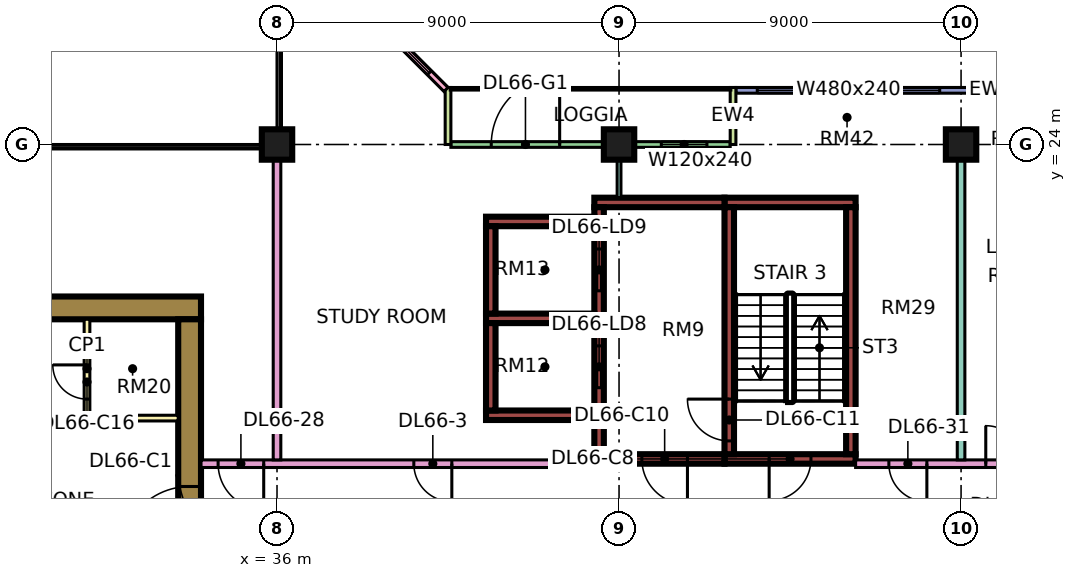
"""IFC4 building model, lengths in metres.
Left out: names, types, materials, properties, quantities, classifications, styles, units other than length and angle.
Written with IfcOpenShell. Run it as: python <this file> out.ifc"""

import sys

from ifc_helpers import new_model, si_unit, direction, frame, frame_2d, origin, origin_2d, place, context, subcontext, project, spatial, rectangle, extrude, element, fill, save


model = new_model("IFC4")
c1 = context("Model", 3, precision=1e-05, world=origin(), true_north=direction((0.0, 1.0)))
c2 = subcontext(c1, "Body", "Model", "MODEL_VIEW")
j1 = project(units=[si_unit("LENGTHUNIT", "METRE"), si_unit("PLANEANGLEUNIT", "RADIAN")], contexts=[c1])
p1 = place(None, origin())
s1 = spatial("IfcSite", under=j1, at=p1, CompositionType="ELEMENT")
p2 = place(p1, origin())
s2 = spatial("IfcBuilding", under=s1, at=p2, CompositionType="ELEMENT")
p3 = place(p2, frame((0.0, 0.0, 284.65)))
s3 = spatial("IfcBuildingStorey", under=s2, at=p3, CompositionType="ELEMENT", Elevation=284.65)
for number, where, z_axis, x_axis in (
    (1, (36.0, 24.0, 0.0), (0.0, 0.0, 1.0), (1.0, 0.0, 0.0)),
    (2, (45.0, 24.0, 0.0), (0.0, 0.0, 1.0), (1.0, 0.0, 0.0)),
    (3, (54.0, 24.0, 0.0), (0.0, 0.0, 1.0), (1.0, 0.0, 0.0)),
):
    element("IfcColumn", number, at=place(p3, frame(where, z_axis=z_axis, x_axis=x_axis)), inside=s3, PredefinedType="COLUMN", context=c2, shape_type="SweptSolid", body=[
        extrude(rectangle(XDim=0.8, YDim=0.8, at=origin_2d()), origin(), (0.0, 0.0, 1.0), 3.75),
    ])
p4 = place(p3, frame((9.0, 19.7, 0.0), z_axis=(0.0, 0.0, 1.0), x_axis=(1.0, 0.0, 0.0)))
e4 = element("IfcWall", 4, at=p4, inside=s3, PredefinedType="SHEAR", context=c2, shape_type="SweptSolid", body=[
    extrude(rectangle(XDim=25.0, YDim=0.6, at=frame_2d((12.5, 0.0))), origin(), (0.0, 0.0, 1.0), 3.75),
])
p5 = place(p4, frame((19.1, 0.0, 0.0)))
e5 = element("IfcOpeningElement", 5, at=p5, cuts=e4, PredefinedType="OPENING", context=c2, shape_type="SweptSolid", body=[
    extrude(rectangle(XDim=1.8, YDim=2.4, at=frame_2d((0.9, 1.2))), frame((0.0, 0.31, 0.0), z_axis=(0.0, -1.0, 0.0), x_axis=(1.0, 0.0, 0.0)), (0.0, 0.0, 1.0), 0.62),
])
p6 = place(p3, frame((33.7, 7.6, 0.0), z_axis=(0.0, 0.0, 1.0), x_axis=(0.0, 1.0, 0.0)))
e6 = element("IfcWall", 6, at=p6, inside=s3, PredefinedType="SHEAR", context=c2, shape_type="SweptSolid", body=[
    extrude(rectangle(XDim=11.8, YDim=0.6, at=frame_2d((5.9, 0.0))), origin(), (0.0, 0.0, 1.0), 3.75),
])
p7 = place(p6, frame((5.6, 0.0, 0.0)))
e7 = element("IfcOpeningElement", 7, at=p7, cuts=e6, PredefinedType="OPENING", context=c2, shape_type="SweptSolid", body=[
    extrude(rectangle(XDim=1.8, YDim=2.4, at=frame_2d((0.9, 1.2))), frame((0.0, 0.31, 0.0), z_axis=(0.0, -1.0, 0.0), x_axis=(1.0, 0.0, 0.0)), (0.0, 0.0, 1.0), 0.62),
])
p8 = place(p3, frame((47.775, 15.725, 0.0), z_axis=(0.0, 0.0, 1.0), x_axis=(1.0, 0.0, 0.0)))
e8 = element("IfcWall", 8, at=p8, inside=s3, PredefinedType="SHEAR", context=c2, shape_type="SweptSolid", body=[
    extrude(rectangle(XDim=3.45, YDim=0.25, at=frame_2d((1.725, 0.0))), origin(), (0.0, 0.0, 1.0), 3.75),
])
p9 = place(p8, frame((1.175, 0.0, 0.0)))
e9 = element("IfcOpeningElement", 9, at=p9, cuts=e8, PredefinedType="OPENING", context=c2, shape_type="SweptSolid", body=[
    extrude(rectangle(XDim=1.1, YDim=2.2, at=frame_2d((0.55, 1.1))), frame((0.0, 0.135, 0.0), z_axis=(0.0, -1.0, 0.0), x_axis=(1.0, 0.0, 0.0)), (0.0, 0.0, 1.0), 0.27),
])
p10 = place(p3, frame((47.775, 22.475, 0.0), z_axis=(0.0, 0.0, 1.0), x_axis=(1.0, 0.0, 0.0)))
e10 = element("IfcWall", 10, at=p10, inside=s3, PredefinedType="SHEAR", context=c2, shape_type="SweptSolid", body=[
    extrude(rectangle(XDim=3.45, YDim=0.25, at=frame_2d((1.725, 0.0))), origin(), (0.0, 0.0, 1.0), 3.75),
])
p11 = place(p3, frame((47.9, 15.85, 0.0), z_axis=(0.0, 0.0, 1.0), x_axis=(0.0, 1.0, 0.0)))
e11 = element("IfcWall", 11, at=p11, inside=s3, PredefinedType="SHEAR", context=c2, shape_type="SweptSolid", body=[
    extrude(rectangle(XDim=6.5, YDim=0.25, at=frame_2d((3.25, 0.0))), origin(), (0.0, 0.0, 1.0), 3.75),
])
p12 = place(p11, frame((0.35, 0.0, 0.0)))
e12 = element("IfcOpeningElement", 12, at=p12, cuts=e11, PredefinedType="OPENING", context=c2, shape_type="SweptSolid", body=[
    extrude(rectangle(XDim=1.1, YDim=2.2, at=frame_2d((0.55, 1.1))), frame((0.0, 0.135, 0.0), z_axis=(0.0, -1.0, 0.0), x_axis=(1.0, 0.0, 0.0)), (0.0, 0.0, 1.0), 0.27),
])
p13 = place(p3, frame((51.1, 15.85, 0.0), z_axis=(0.0, 0.0, 1.0), x_axis=(0.0, 1.0, 0.0)))
e13 = element("IfcWall", 13, at=p13, inside=s3, PredefinedType="SHEAR", context=c2, shape_type="SweptSolid", body=[
    extrude(rectangle(XDim=6.5, YDim=0.25, at=frame_2d((3.25, 0.0))), origin(), (0.0, 0.0, 1.0), 3.75),
])
p14 = place(p3, frame((44.35, 15.725, 0.0), z_axis=(0.0, 0.0, 1.0), x_axis=(1.0, 0.0, 0.0)))
e14 = element("IfcWall", 14, at=p14, inside=s3, PredefinedType="SHEAR", context=c2, shape_type="SweptSolid", body=[
    extrude(rectangle(XDim=3.425, YDim=0.25, at=frame_2d((1.712, 0.0))), origin(), (0.0, 0.0, 1.0), 3.75),
])
p15 = place(p14, frame((1.25, 0.0, 0.0)))
e15 = element("IfcOpeningElement", 15, at=p15, cuts=e14, PredefinedType="OPENING", context=c2, shape_type="SweptSolid", body=[
    extrude(rectangle(XDim=1.2, YDim=2.2, at=frame_2d((0.6, 1.1))), frame((0.0, 0.135, 0.0), z_axis=(0.0, -1.0, 0.0), x_axis=(1.0, 0.0, 0.0)), (0.0, 0.0, 1.0), 0.27),
])
p16 = place(p3, frame((44.35, 22.475, 0.0), z_axis=(0.0, 0.0, 1.0), x_axis=(1.0, 0.0, 0.0)))
e16 = element("IfcWall", 16, at=p16, inside=s3, PredefinedType="SHEAR", context=c2, shape_type="SweptSolid", body=[
    extrude(rectangle(XDim=3.425, YDim=0.25, at=frame_2d((1.712, 0.0))), origin(), (0.0, 0.0, 1.0), 3.75),
])
p17 = place(p3, frame((44.475, 15.85, 0.0), z_axis=(0.0, 0.0, 1.0), x_axis=(0.0, 1.0, 0.0)))
e17 = element("IfcWall", 17, at=p17, inside=s3, PredefinedType="SHEAR", context=c2, shape_type="SweptSolid", body=[
    extrude(rectangle(XDim=6.5, YDim=0.25, at=frame_2d((3.25, 0.0))), origin(), (0.0, 0.0, 1.0), 3.75),
])
p18 = place(p17, frame((1.75, 0.0, 0.0)))
e18 = element("IfcOpeningElement", 18, at=p18, cuts=e17, PredefinedType="OPENING", context=c2, shape_type="SweptSolid", body=[
    extrude(rectangle(XDim=1.1, YDim=2.2, at=frame_2d((0.55, 1.1))), frame((0.0, 0.135, 0.0), z_axis=(0.0, -1.0, 0.0), x_axis=(1.0, 0.0, 0.0)), (0.0, 0.0, 1.0), 0.27),
])
p19 = place(p17, frame((4.3, 0.0, 0.0)))
e19 = element("IfcOpeningElement", 19, at=p19, cuts=e17, PredefinedType="OPENING", context=c2, shape_type="SweptSolid", body=[
    extrude(rectangle(XDim=1.1, YDim=2.2, at=frame_2d((0.55, 1.1))), frame((0.0, 0.135, 0.0), z_axis=(0.0, -1.0, 0.0), x_axis=(1.0, 0.0, 0.0)), (0.0, 0.0, 1.0), 0.27),
])
for number, where, z_axis, x_axis in (
    (20, (41.5, 16.875, 0.0), (0.0, 0.0, 1.0), (1.0, 0.0, 0.0)),
    (21, (41.5, 19.425, 0.0), (0.0, 0.0, 1.0), (1.0, 0.0, 0.0)),
    (22, (41.5, 21.975, 0.0), (0.0, 0.0, 1.0), (1.0, 0.0, 0.0)),
):
    element("IfcWall", number, at=place(p3, frame(where, z_axis=z_axis, x_axis=x_axis)), inside=s3, PredefinedType="SHEAR", context=c2, shape_type="SweptSolid", body=[
        extrude(rectangle(XDim=2.85, YDim=0.25, at=frame_2d((1.425, 0.0))), origin(), (0.0, 0.0, 1.0), 3.75),
    ])
for number, where, z_axis, x_axis in (
    (23, (41.625, 17.0, 0.0), (0.0, 0.0, 1.0), (0.0, 1.0, 0.0)),
    (24, (41.625, 19.55, 0.0), (0.0, 0.0, 1.0), (0.0, 1.0, 0.0)),
):
    element("IfcWall", number, at=place(p3, frame(where, z_axis=z_axis, x_axis=x_axis)), inside=s3, PredefinedType="SHEAR", context=c2, shape_type="SweptSolid", body=[
        extrude(rectangle(XDim=2.3, YDim=0.25, at=frame_2d((1.15, 0.0))), origin(), (0.0, 0.0, 1.0), 3.75),
    ])
p20 = place(p3, frame((61.5, 25.425, 0.0), z_axis=(0.0, 0.0, 1.0), x_axis=(-1.0, 0.0, 0.0)))
e25 = element("IfcWall", 25, at=p20, inside=s3, PredefinedType="SOLIDWALL", context=c2, shape_type="SweptSolid", body=[
    extrude(rectangle(XDim=13.425, YDim=0.15, at=frame_2d((6.712, 0.0))), origin(), (0.0, 0.0, 1.0), 3.35),
])
p21 = place(p20, frame((0.3, 0.0, 0.45)))
e26 = element("IfcOpeningElement", 26, at=p21, cuts=e25, PredefinedType="OPENING", context=c2, shape_type="SweptSolid", body=[
    extrude(rectangle(XDim=0.9, YDim=2.4, at=frame_2d((0.45, 1.2))), frame((0.0, 0.085, 0.0), z_axis=(0.0, -1.0, 0.0), x_axis=(1.0, 0.0, 0.0)), (0.0, 0.0, 1.0), 0.17),
])
p22 = place(p20, frame((2.1, 0.0, 0.45)))
e27 = element("IfcOpeningElement", 27, at=p22, cuts=e25, PredefinedType="OPENING", context=c2, shape_type="SweptSolid", body=[
    extrude(rectangle(XDim=1.8, YDim=2.4, at=frame_2d((0.9, 1.2))), frame((0.0, 0.085, 0.0), z_axis=(0.0, -1.0, 0.0), x_axis=(1.0, 0.0, 0.0)), (0.0, 0.0, 1.0), 0.17),
])
p23 = place(p20, frame((5.1, 0.0, 0.45)))
e28 = element("IfcOpeningElement", 28, at=p23, cuts=e25, PredefinedType="OPENING", context=c2, shape_type="SweptSolid", body=[
    extrude(rectangle(XDim=1.8, YDim=2.4, at=frame_2d((0.9, 1.2))), frame((0.0, 0.085, 0.0), z_axis=(0.0, -1.0, 0.0), x_axis=(1.0, 0.0, 0.0)), (0.0, 0.0, 1.0), 0.17),
])
p24 = place(p20, frame((8.062, 0.0, 0.45)))
e29 = element("IfcOpeningElement", 29, at=p24, cuts=e25, PredefinedType="OPENING", context=c2, shape_type="SweptSolid", body=[
    extrude(rectangle(XDim=4.8, YDim=2.4, at=frame_2d((2.4, 1.2))), frame((0.0, 0.085, 0.0), z_axis=(0.0, -1.0, 0.0), x_axis=(1.0, 0.0, 0.0)), (0.0, 0.0, 1.0), 0.17),
])
p25 = place(p3, frame((47.925, 24.0, 0.0), z_axis=(0.0, 0.0, 1.0), x_axis=(-1.0, 0.0, 0.0)))
e30 = element("IfcWall", 30, at=p25, inside=s3, PredefinedType="SOLIDWALL", context=c2, shape_type="SweptSolid", body=[
    extrude(rectangle(XDim=7.35, YDim=0.15, at=frame_2d((3.675, 0.0))), origin(), (0.0, 0.0, 1.0), 3.35),
])
p26 = place(p25, frame((0.613, 0.0, 0.45)))
e31 = element("IfcOpeningElement", 31, at=p26, cuts=e30, PredefinedType="OPENING", context=c2, shape_type="SweptSolid", body=[
    extrude(rectangle(XDim=1.2, YDim=2.4, at=frame_2d((0.6, 1.2))), frame((0.0, 0.085, 0.0), z_axis=(0.0, -1.0, 0.0), x_axis=(1.0, 0.0, 0.0)), (0.0, 0.0, 1.0), 0.17),
])
p27 = place(p25, frame((4.488, 0.0, 0.0)))
e32 = element("IfcOpeningElement", 32, at=p27, cuts=e30, PredefinedType="OPENING", context=c2, shape_type="SweptSolid", body=[
    extrude(rectangle(XDim=1.8, YDim=2.4, at=frame_2d((0.9, 1.2))), frame((0.0, 0.085, 0.0), z_axis=(0.0, -1.0, 0.0), x_axis=(1.0, 0.0, 0.0)), (0.0, 0.0, 1.0), 0.17),
])
for number, where, z_axis, x_axis in (
    (33, (48.0, 25.5, 0.0), (0.0, 0.0, 1.0), (0.0, -1.0, 0.0)),
    (34, (40.5, 25.5, 0.0), (0.0, 0.0, 1.0), (0.0, -1.0, 0.0)),
):
    element("IfcWall", number, at=place(p3, frame(where, z_axis=z_axis, x_axis=x_axis)), inside=s3, PredefinedType="SOLIDWALL", context=c2, shape_type="SweptSolid", body=[
        extrude(rectangle(XDim=1.5, YDim=0.15, at=frame_2d((0.75, 0.0))), origin(), (0.0, 0.0, 1.0), 3.35),
    ])
p28 = place(p3, frame((40.447, 25.447, 0.0), z_axis=(0.0, 0.0, 1.0), x_axis=(-0.707106781187, 0.707106781187, 0.0)))
e35 = element("IfcWall", 35, at=p28, inside=s3, PredefinedType="SOLIDWALL", context=c2, shape_type="SweptSolid", body=[
    extrude(rectangle(XDim=4.243, YDim=0.15, at=frame_2d((2.121, 0.0))), origin(), (0.0, 0.0, 1.0), 3.35),
])
p29 = place(p28, frame((0.621, 0.0, 0.45)))
e36 = element("IfcOpeningElement", 36, at=p29, cuts=e35, PredefinedType="OPENING", context=c2, shape_type="SweptSolid", body=[
    extrude(rectangle(XDim=3.0, YDim=2.4, at=frame_2d((1.5, 1.2))), frame((0.0, 0.085, 0.0), z_axis=(0.0, -1.0, 0.0), x_axis=(1.0, 0.0, 0.0)), (0.0, 0.0, 1.0), 0.17),
])
p30 = place(p3, frame((31.0, 16.8, 0.0), z_axis=(0.0, 0.0, 1.0), x_axis=(0.0, 1.0, 0.0)))
e37 = element("IfcWall", 37, at=p30, inside=s3, PredefinedType="PARTITIONING", context=c2, shape_type="SweptSolid", body=[
    extrude(rectangle(XDim=2.6, YDim=0.15, at=frame_2d((1.3, 0.0))), origin(), (0.0, 0.0, 1.0), 3.35),
])
p31 = place(p30, frame((0.5, 0.0, 0.0)))
e38 = element("IfcOpeningElement", 38, at=p31, cuts=e37, PredefinedType="OPENING", context=c2, shape_type="SweptSolid", body=[
    extrude(rectangle(XDim=0.9, YDim=2.1, at=frame_2d((0.45, 1.05))), frame((0.0, 0.085, 0.0), z_axis=(0.0, -1.0, 0.0), x_axis=(1.0, 0.0, 0.0)), (0.0, 0.0, 1.0), 0.17),
])
p32 = place(p3, frame((31.0, 16.8, 0.0), z_axis=(0.0, 0.0, 1.0), x_axis=(1.0, 0.0, 0.0)))
e39 = element("IfcWall", 39, at=p32, inside=s3, PredefinedType="PARTITIONING", context=c2, shape_type="SweptSolid", body=[
    extrude(rectangle(XDim=2.4, YDim=0.15, at=frame_2d((1.2, 0.0))), origin(), (0.0, 0.0, 1.0), 3.35),
])
p33 = place(p3, frame((34.0, 15.6, 0.0), z_axis=(0.0, 0.0, 1.0), x_axis=(1.0, 0.0, 0.0)))
e40 = element("IfcWall", 40, at=p33, inside=s3, PredefinedType="PARTITIONING", context=c2, shape_type="SweptSolid", body=[
    extrude(rectangle(XDim=10.35, YDim=0.2, at=frame_2d((5.175, 0.0))), origin(), (0.0, 0.0, 1.0), 3.35),
])
p34 = place(p33, frame((5.6, 0.0, 0.0)))
e41 = element("IfcOpeningElement", 41, at=p34, cuts=e40, PredefinedType="OPENING", context=c2, shape_type="SweptSolid", body=[
    extrude(rectangle(XDim=1.0, YDim=2.1, at=frame_2d((0.5, 1.05))), frame((0.0, 0.11, 0.0), z_axis=(0.0, -1.0, 0.0), x_axis=(1.0, 0.0, 0.0)), (0.0, 0.0, 1.0), 0.22),
])
p35 = place(p33, frame((0.45, 0.0, 0.0)))
e42 = element("IfcOpeningElement", 42, at=p35, cuts=e40, PredefinedType="OPENING", context=c2, shape_type="SweptSolid", body=[
    extrude(rectangle(XDim=1.2, YDim=2.1, at=frame_2d((0.6, 1.05))), frame((0.0, 0.11, 0.0), z_axis=(0.0, -1.0, 0.0), x_axis=(1.0, 0.0, 0.0)), (0.0, 0.0, 1.0), 0.22),
])
p36 = place(p3, frame((36.0, 15.7, 0.0), z_axis=(0.0, 0.0, 1.0), x_axis=(0.0, 1.0, 0.0)))
e43 = element("IfcWall", 43, at=p36, inside=s3, PredefinedType="PARTITIONING", context=c2, shape_type="SweptSolid", body=[
    extrude(rectangle(XDim=8.3, YDim=0.2, at=frame_2d((4.15, 0.0))), origin(), (0.0, 0.0, 1.0), 3.35),
])
p37 = place(p3, frame((45.0, 22.6, 0.0), z_axis=(0.0, 0.0, 1.0), x_axis=(0.0, 1.0, 0.0)))
e44 = element("IfcWall", 44, at=p37, inside=s3, PredefinedType="PARTITIONING", context=c2, shape_type="SweptSolid", body=[
    extrude(rectangle(XDim=1.326, YDim=0.1, at=frame_2d((0.663, 0.0))), origin(), (0.0, 0.0, 1.0), 3.35),
])
p38 = place(p3, frame((51.225, 15.6, 0.0), z_axis=(0.0, 0.0, 1.0), x_axis=(1.0, 0.0, 0.0)))
e45 = element("IfcWall", 45, at=p38, inside=s3, PredefinedType="PARTITIONING", context=c2, shape_type="SweptSolid", body=[
    extrude(rectangle(XDim=11.701, YDim=0.2, at=frame_2d((5.851, 0.0))), origin(), (0.0, 0.0, 1.0), 3.35),
])
p39 = place(p38, frame((3.425, 0.0, 0.0)))
e46 = element("IfcOpeningElement", 46, at=p39, cuts=e45, PredefinedType="OPENING", context=c2, shape_type="SweptSolid", body=[
    extrude(rectangle(XDim=1.0, YDim=2.1, at=frame_2d((0.5, 1.05))), frame((0.0, 0.11, 0.0), z_axis=(0.0, -1.0, 0.0), x_axis=(1.0, 0.0, 0.0)), (0.0, 0.0, 1.0), 0.22),
])
p40 = place(p38, frame((0.875, 0.0, 0.0)))
e47 = element("IfcOpeningElement", 47, at=p40, cuts=e45, PredefinedType="OPENING", context=c2, shape_type="SweptSolid", body=[
    extrude(rectangle(XDim=1.0, YDim=2.1, at=frame_2d((0.5, 1.05))), frame((0.0, 0.11, 0.0), z_axis=(0.0, -1.0, 0.0), x_axis=(1.0, 0.0, 0.0)), (0.0, 0.0, 1.0), 0.22),
])
p41 = place(p3, frame((54.0, 15.7, 0.0), z_axis=(0.0, 0.0, 1.0), x_axis=(0.0, 1.0, 0.0)))
e48 = element("IfcWall", 48, at=p41, inside=s3, PredefinedType="PARTITIONING", context=c2, shape_type="SweptSolid", body=[
    extrude(rectangle(XDim=8.3, YDim=0.2, at=frame_2d((4.15, 0.0))), origin(), (0.0, 0.0, 1.0), 3.35),
])
p42 = place(p23, origin())
e49 = element("IfcWindow", 49, at=p42, inside=s3, PartitioningType="SINGLE_PANEL", PredefinedType="WINDOW", context=c2, shape_type="SweptSolid", body=[
    extrude(rectangle(XDim=1.8, YDim=2.4, at=frame_2d((0.9, 1.2))), frame((0.0, 0.03, 0.0), z_axis=(0.0, -1.0, 0.0), x_axis=(1.0, 0.0, 0.0)), (0.0, 0.0, 1.0), 0.06),
])
fill(e28, e49)
p43 = place(p24, origin())
e50 = element("IfcWindow", 50, at=p43, inside=s3, PartitioningType="SINGLE_PANEL", PredefinedType="WINDOW", context=c2, shape_type="SweptSolid", body=[
    extrude(rectangle(XDim=4.8, YDim=2.4, at=frame_2d((2.4, 1.2))), frame((0.0, 0.03, 0.0), z_axis=(0.0, -1.0, 0.0), x_axis=(1.0, 0.0, 0.0)), (0.0, 0.0, 1.0), 0.06),
])
fill(e29, e50)
p44 = place(p26, origin())
e51 = element("IfcWindow", 51, at=p44, inside=s3, PartitioningType="SINGLE_PANEL", PredefinedType="WINDOW", context=c2, shape_type="SweptSolid", body=[
    extrude(rectangle(XDim=1.2, YDim=2.4, at=frame_2d((0.6, 1.2))), frame((0.0, 0.03, 0.0), z_axis=(0.0, -1.0, 0.0), x_axis=(1.0, 0.0, 0.0)), (0.0, 0.0, 1.0), 0.06),
])
fill(e31, e51)
p45 = place(p27, frame((1.8, 0.0, 0.0), z_axis=(0.0, 0.0, 1.0), x_axis=(-1.0, 0.0, 0.0)))
e52 = element("IfcDoor", 52, at=p45, inside=s3, OperationType="DOUBLE_DOOR_SINGLE_SWING", PredefinedType="DOOR", context=c2, shape_type="SweptSolid", body=[
    extrude(rectangle(XDim=1.8, YDim=2.4, at=frame_2d((0.9, 1.2))), frame((0.0, 0.025, 0.0), z_axis=(0.0, -1.0, 0.0), x_axis=(1.0, 0.0, 0.0)), (0.0, 0.0, 1.0), 0.05),
])
fill(e32, e52)
p46 = place(p29, origin())
e53 = element("IfcWindow", 53, at=p46, inside=s3, PartitioningType="SINGLE_PANEL", PredefinedType="WINDOW", context=c2, shape_type="SweptSolid", body=[
    extrude(rectangle(XDim=3.0, YDim=2.4, at=frame_2d((1.5, 1.2))), frame((0.0, 0.03, 0.0), z_axis=(0.0, -1.0, 0.0), x_axis=(1.0, 0.0, 0.0)), (0.0, 0.0, 1.0), 0.06),
])
fill(e36, e53)
p47 = place(p7, origin())
e54 = element("IfcDoor", 54, at=p47, inside=s3, OperationType="DOUBLE_DOOR_SINGLE_SWING", PredefinedType="DOOR", context=c2, shape_type="SweptSolid", body=[
    extrude(rectangle(XDim=1.8, YDim=2.4, at=frame_2d((0.9, 1.2))), frame((0.0, 0.025, 0.0), z_axis=(0.0, -1.0, 0.0), x_axis=(1.0, 0.0, 0.0)), (0.0, 0.0, 1.0), 0.05),
])
fill(e7, e54)
p48 = place(p9, frame((1.1, 0.0, 0.0), z_axis=(0.0, 0.0, 1.0), x_axis=(-1.0, 0.0, 0.0)))
e55 = element("IfcDoor", 55, at=p48, inside=s3, OperationType="SINGLE_SWING_LEFT", PredefinedType="DOOR", context=c2, shape_type="SweptSolid", body=[
    extrude(rectangle(XDim=1.1, YDim=2.2, at=frame_2d((0.55, 1.1))), frame((0.0, 0.025, 0.0), z_axis=(0.0, -1.0, 0.0), x_axis=(1.0, 0.0, 0.0)), (0.0, 0.0, 1.0), 0.05),
])
fill(e9, e55)
p49 = place(p15, origin())
e56 = element("IfcDoor", 56, at=p49, inside=s3, OperationType="SINGLE_SWING_RIGHT", PredefinedType="DOOR", context=c2, shape_type="SweptSolid", body=[
    extrude(rectangle(XDim=1.2, YDim=2.2, at=frame_2d((0.6, 1.1))), frame((0.0, 0.025, 0.0), z_axis=(0.0, -1.0, 0.0), x_axis=(1.0, 0.0, 0.0)), (0.0, 0.0, 1.0), 0.05),
])
fill(e15, e56)
p50 = place(p12, frame((1.1, 0.0, 0.0), z_axis=(0.0, 0.0, 1.0), x_axis=(-1.0, 0.0, 0.0)))
e57 = element("IfcDoor", 57, at=p50, inside=s3, OperationType="SINGLE_SWING_RIGHT", PredefinedType="DOOR", context=c2, shape_type="SweptSolid", body=[
    extrude(rectangle(XDim=1.1, YDim=2.2, at=frame_2d((0.55, 1.1))), frame((0.0, 0.025, 0.0), z_axis=(0.0, -1.0, 0.0), x_axis=(1.0, 0.0, 0.0)), (0.0, 0.0, 1.0), 0.05),
])
fill(e12, e57)
p51 = place(p18, origin())
e58 = element("IfcDoor", 58, at=p51, inside=s3, OperationType="DOUBLE_DOOR_SLIDING", PredefinedType="DOOR", context=c2, shape_type="SweptSolid", body=[
    extrude(rectangle(XDim=1.1, YDim=2.2, at=frame_2d((0.55, 1.1))), frame((0.0, 0.025, 0.0), z_axis=(0.0, -1.0, 0.0), x_axis=(1.0, 0.0, 0.0)), (0.0, 0.0, 1.0), 0.05),
])
fill(e18, e58)
p52 = place(p19, origin())
e59 = element("IfcDoor", 59, at=p52, inside=s3, OperationType="DOUBLE_DOOR_SLIDING", PredefinedType="DOOR", context=c2, shape_type="SweptSolid", body=[
    extrude(rectangle(XDim=1.1, YDim=2.2, at=frame_2d((0.55, 1.1))), frame((0.0, 0.025, 0.0), z_axis=(0.0, -1.0, 0.0), x_axis=(1.0, 0.0, 0.0)), (0.0, 0.0, 1.0), 0.05),
])
fill(e19, e59)
p53 = place(p31, frame((0.9, 0.0, 0.0), z_axis=(0.0, 0.0, 1.0), x_axis=(-1.0, 0.0, 0.0)))
e60 = element("IfcDoor", 60, at=p53, inside=s3, OperationType="SINGLE_SWING_RIGHT", PredefinedType="DOOR", context=c2, shape_type="SweptSolid", body=[
    extrude(rectangle(XDim=0.9, YDim=2.1, at=frame_2d((0.45, 1.05))), frame((0.0, 0.025, 0.0), z_axis=(0.0, -1.0, 0.0), x_axis=(1.0, 0.0, 0.0)), (0.0, 0.0, 1.0), 0.05),
])
fill(e38, e60)
p54 = place(p34, origin())
e61 = element("IfcDoor", 61, at=p54, inside=s3, OperationType="SINGLE_SWING_RIGHT", PredefinedType="DOOR", context=c2, shape_type="SweptSolid", body=[
    extrude(rectangle(XDim=1.0, YDim=2.1, at=frame_2d((0.5, 1.05))), frame((0.0, 0.025, 0.0), z_axis=(0.0, -1.0, 0.0), x_axis=(1.0, 0.0, 0.0)), (0.0, 0.0, 1.0), 0.05),
])
fill(e41, e61)
p55 = place(p39, origin())
e62 = element("IfcDoor", 62, at=p55, inside=s3, OperationType="SINGLE_SWING_LEFT", PredefinedType="DOOR", context=c2, shape_type="SweptSolid", body=[
    extrude(rectangle(XDim=1.0, YDim=2.1, at=frame_2d((0.5, 1.05))), frame((0.0, 0.025, 0.0), z_axis=(0.0, -1.0, 0.0), x_axis=(1.0, 0.0, 0.0)), (0.0, 0.0, 1.0), 0.05),
])
fill(e46, e62)
p56 = place(p35, origin())
e63 = element("IfcDoor", 63, at=p56, inside=s3, OperationType="SINGLE_SWING_RIGHT", PredefinedType="DOOR", context=c2, shape_type="SweptSolid", body=[
    extrude(rectangle(XDim=1.2, YDim=2.1, at=frame_2d((0.6, 1.05))), frame((0.0, 0.025, 0.0), z_axis=(0.0, -1.0, 0.0), x_axis=(1.0, 0.0, 0.0)), (0.0, 0.0, 1.0), 0.05),
])
fill(e42, e63)
p57 = place(p40, origin())
e64 = element("IfcDoor", 64, at=p57, inside=s3, OperationType="SINGLE_SWING_RIGHT", PredefinedType="DOOR", context=c2, shape_type="SweptSolid", body=[
    extrude(rectangle(XDim=1.0, YDim=2.1, at=frame_2d((0.5, 1.05))), frame((0.0, 0.025, 0.0), z_axis=(0.0, -1.0, 0.0), x_axis=(1.0, 0.0, 0.0)), (0.0, 0.0, 1.0), 0.05),
])
fill(e47, e64)
save(model, sys.argv[1])
